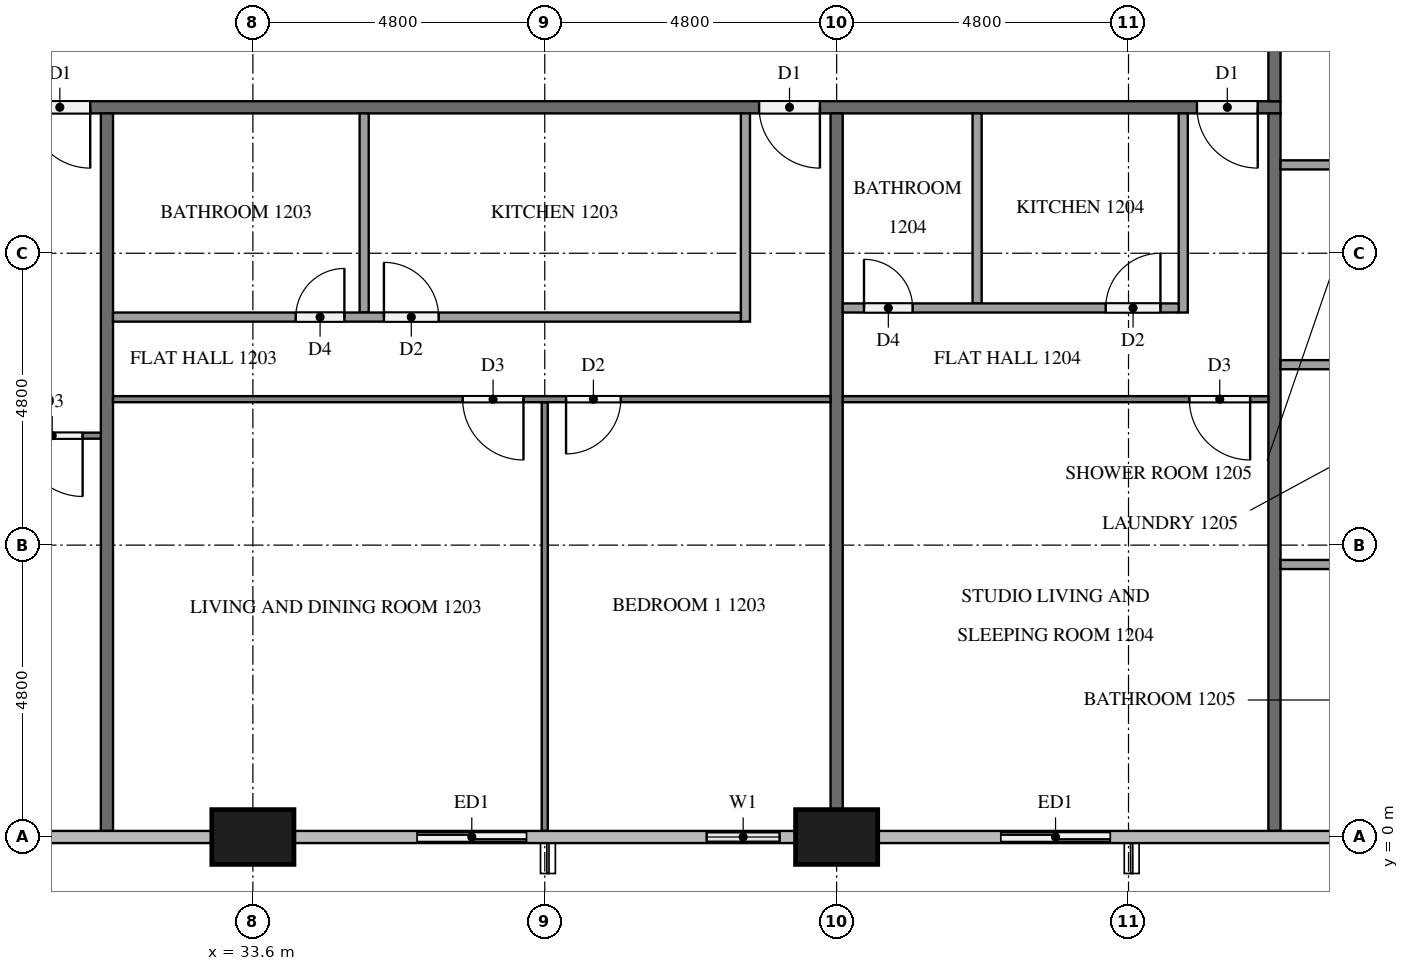
"""IFC4 building model, lengths in metres.
Left out: names, types, materials, properties, quantities, classifications, styles, units other than length and angle.
Written with IfcOpenShell. Run it as: python <this file> out.ifc"""

import sys

from ifc_helpers import new_model, si_unit, direction, frame, frame_2d, origin, origin_2d, place, context, subcontext, project, spatial, rectangle, extrude, element, fill, save


model = new_model("IFC4")
c1 = context("Model", 3, precision=1e-05, world=origin(), true_north=direction((0.0, 1.0)))
c2 = subcontext(c1, "Body", "Model", "MODEL_VIEW")
j1 = project(units=[si_unit("LENGTHUNIT", "METRE"), si_unit("PLANEANGLEUNIT", "RADIAN")], contexts=[c1])
p1 = place(None, origin())
s1 = spatial("IfcSite", under=j1, at=p1, CompositionType="ELEMENT")
p2 = place(p1, origin())
s2 = spatial("IfcBuilding", under=s1, at=p2, CompositionType="ELEMENT")
p3 = place(p2, frame((0.0, 0.0, 50.4)))
s3 = spatial("IfcBuildingStorey", under=s2, at=p3, CompositionType="ELEMENT", Elevation=50.4)
for number, where, z_axis, x_axis in (
    (1, (33.6, 0.0, 0.0), (0.0, 0.0, 1.0), (1.0, 0.0, 0.0)),
    (2, (43.2, 0.0, 0.0), (0.0, 0.0, 1.0), (1.0, 0.0, 0.0)),
):
    element("IfcColumn", number, at=place(p3, frame(where, z_axis=z_axis, x_axis=x_axis)), inside=s3, PredefinedType="COLUMN", context=c2, shape_type="SweptSolid", body=[
        extrude(rectangle(XDim=1.35, YDim=0.9, at=origin_2d()), origin(), (0.0, 0.0, 1.0), 3.1),
    ])
p4 = place(p3, frame((36.0, 0.0, 0.0), z_axis=(0.0, 0.0, 1.0), x_axis=(1.0, 0.0, 0.0)))
e3 = element("IfcWall", 3, at=p4, inside=s3, PredefinedType="SOLIDWALL", context=c2, shape_type="SweptSolid", body=[
    extrude(rectangle(XDim=2.4, YDim=0.15, at=frame_2d((1.2, 0.0))), origin(), (0.0, 0.0, 1.0), 3.1),
])
p5 = place(p4, frame((0.3, 0.0, 0.0)))
e4 = element("IfcOpeningElement", 4, at=p5, cuts=e3, PredefinedType="OPENING", context=c2, shape_type="SweptSolid", body=[
    extrude(rectangle(XDim=1.8, YDim=2.4, at=frame_2d((0.9, 1.2))), frame((0.0, 0.085, 0.0), z_axis=(0.0, -1.0, 0.0), x_axis=(1.0, 0.0, 0.0)), (0.0, 0.0, 1.0), 0.17),
])
p6 = place(p3, frame((40.8, 0.0, 0.0), z_axis=(0.0, 0.0, 1.0), x_axis=(1.0, 0.0, 0.0)))
e5 = element("IfcWall", 5, at=p6, inside=s3, PredefinedType="SOLIDWALL", context=c2, shape_type="SweptSolid", body=[
    extrude(rectangle(XDim=1.725, YDim=0.15, at=frame_2d((0.862, 0.0))), origin(), (0.0, 0.0, 1.0), 3.1),
])
p7 = place(p6, frame((0.262, 0.0, 0.9)))
e6 = element("IfcOpeningElement", 6, at=p7, cuts=e5, PredefinedType="OPENING", context=c2, shape_type="SweptSolid", body=[
    extrude(rectangle(XDim=1.2, YDim=1.4, at=frame_2d((0.6, 0.7))), frame((0.0, 0.085, 0.0), z_axis=(0.0, -1.0, 0.0), x_axis=(1.0, 0.0, 0.0)), (0.0, 0.0, 1.0), 0.17),
])
p8 = place(p3, frame((45.6, 0.0, 0.0), z_axis=(0.0, 0.0, 1.0), x_axis=(1.0, 0.0, 0.0)))
e7 = element("IfcWall", 7, at=p8, inside=s3, PredefinedType="SOLIDWALL", context=c2, shape_type="SweptSolid", body=[
    extrude(rectangle(XDim=2.4, YDim=0.15, at=frame_2d((1.2, 0.0))), origin(), (0.0, 0.0, 1.0), 3.1),
])
p9 = place(p8, frame((0.3, 0.0, 0.0)))
e8 = element("IfcOpeningElement", 8, at=p9, cuts=e7, PredefinedType="OPENING", context=c2, shape_type="SweptSolid", body=[
    extrude(rectangle(XDim=1.8, YDim=2.4, at=frame_2d((0.9, 1.2))), frame((0.0, 0.085, 0.0), z_axis=(0.0, -1.0, 0.0), x_axis=(1.0, 0.0, 0.0)), (0.0, 0.0, 1.0), 0.17),
])
p10 = place(p3, frame((50.5, 12.0, 0.0), z_axis=(0.0, 0.0, 1.0), x_axis=(-1.0, 0.0, 0.0)))
e9 = element("IfcWall", 9, at=p10, inside=s3, PredefinedType="PARTITIONING", context=c2, shape_type="SweptSolid", body=[
    extrude(rectangle(XDim=38.6, YDim=0.2, at=frame_2d((19.3, 0.0))), origin(), (0.0, 0.0, 1.0), 3.1),
])
p11 = place(p10, frame((36.375, 0.0, 0.0)))
e10 = element("IfcOpeningElement", 10, at=p11, cuts=e9, PredefinedType="OPENING", context=c2, shape_type="SweptSolid", body=[
    extrude(rectangle(XDim=1.0, YDim=2.1, at=frame_2d((0.5, 1.05))), frame((0.0, 0.11, 0.0), z_axis=(0.0, -1.0, 0.0), x_axis=(1.0, 0.0, 0.0)), (0.0, 0.0, 1.0), 0.22),
])
p12 = place(p10, frame((19.575, 0.0, 0.0)))
e11 = element("IfcOpeningElement", 11, at=p12, cuts=e9, PredefinedType="OPENING", context=c2, shape_type="SweptSolid", body=[
    extrude(rectangle(XDim=1.0, YDim=2.1, at=frame_2d((0.5, 1.05))), frame((0.0, 0.11, 0.0), z_axis=(0.0, -1.0, 0.0), x_axis=(1.0, 0.0, 0.0)), (0.0, 0.0, 1.0), 0.22),
])
p13 = place(p10, frame((7.575, 0.0, 0.0)))
e12 = element("IfcOpeningElement", 12, at=p13, cuts=e9, PredefinedType="OPENING", context=c2, shape_type="SweptSolid", body=[
    extrude(rectangle(XDim=1.0, YDim=2.1, at=frame_2d((0.5, 1.05))), frame((0.0, 0.11, 0.0), z_axis=(0.0, -1.0, 0.0), x_axis=(1.0, 0.0, 0.0)), (0.0, 0.0, 1.0), 0.22),
])
p14 = place(p10, frame((0.375, 0.0, 0.0)))
e13 = element("IfcOpeningElement", 13, at=p14, cuts=e9, PredefinedType="OPENING", context=c2, shape_type="SweptSolid", body=[
    extrude(rectangle(XDim=1.0, YDim=2.1, at=frame_2d((0.5, 1.05))), frame((0.0, 0.11, 0.0), z_axis=(0.0, -1.0, 0.0), x_axis=(1.0, 0.0, 0.0)), (0.0, 0.0, 1.0), 0.22),
])
p15 = place(p3, frame((50.4, 40.7, 0.0), z_axis=(0.0, 0.0, 1.0), x_axis=(0.0, -1.0, 0.0)))
e14 = element("IfcWall", 14, at=p15, inside=s3, PredefinedType="PARTITIONING", context=c2, shape_type="SweptSolid", body=[
    extrude(rectangle(XDim=28.6, YDim=0.2, at=frame_2d((14.3, 0.0))), origin(), (0.0, 0.0, 1.0), 3.1),
])
p16 = place(p15, frame((21.725, 0.0, 0.0)))
e15 = element("IfcOpeningElement", 15, at=p16, cuts=e14, PredefinedType="OPENING", context=c2, shape_type="SweptSolid", body=[
    extrude(rectangle(XDim=1.1, YDim=2.1, at=frame_2d((0.55, 1.05))), frame((0.0, 0.11, 0.0), z_axis=(0.0, -1.0, 0.0), x_axis=(1.0, 0.0, 0.0)), (0.0, 0.0, 1.0), 0.22),
])
p17 = place(p15, frame((12.175, 0.0, 0.0)))
e16 = element("IfcOpeningElement", 16, at=p17, cuts=e14, PredefinedType="OPENING", context=c2, shape_type="SweptSolid", body=[
    extrude(rectangle(XDim=1.0, YDim=2.1, at=frame_2d((0.5, 1.05))), frame((0.0, 0.11, 0.0), z_axis=(0.0, -1.0, 0.0), x_axis=(1.0, 0.0, 0.0)), (0.0, 0.0, 1.0), 0.22),
])
p18 = place(p15, frame((10.625, 0.0, 0.0)))
e17 = element("IfcOpeningElement", 17, at=p18, cuts=e14, PredefinedType="OPENING", context=c2, shape_type="SweptSolid", body=[
    extrude(rectangle(XDim=1.0, YDim=2.1, at=frame_2d((0.5, 1.05))), frame((0.0, 0.11, 0.0), z_axis=(0.0, -1.0, 0.0), x_axis=(1.0, 0.0, 0.0)), (0.0, 0.0, 1.0), 0.22),
])
p19 = place(p3, frame((31.2, 11.9, 0.0), z_axis=(0.0, 0.0, 1.0), x_axis=(0.0, -1.0, 0.0)))
e18 = element("IfcWall", 18, at=p19, inside=s3, PredefinedType="PARTITIONING", context=c2, shape_type="SweptSolid", body=[
    extrude(rectangle(XDim=11.8, YDim=0.2, at=frame_2d((5.9, 0.0))), origin(), (0.0, 0.0, 1.0), 3.1),
])
p20 = place(p3, frame((43.2, 11.9, 0.0), z_axis=(0.0, 0.0, 1.0), x_axis=(0.0, -1.0, 0.0)))
e19 = element("IfcWall", 19, at=p20, inside=s3, PredefinedType="PARTITIONING", context=c2, shape_type="SweptSolid", body=[
    extrude(rectangle(XDim=11.45, YDim=0.2, at=frame_2d((5.725, 0.0))), origin(), (0.0, 0.0, 1.0), 3.1),
])
p21 = place(p3, frame((50.4, 11.9, 0.0), z_axis=(0.0, 0.0, 1.0), x_axis=(0.0, -1.0, 0.0)))
e20 = element("IfcWall", 20, at=p21, inside=s3, PredefinedType="PARTITIONING", context=c2, shape_type="SweptSolid", body=[
    extrude(rectangle(XDim=11.8, YDim=0.2, at=frame_2d((5.9, 0.0))), origin(), (0.0, 0.0, 1.0), 3.1),
])
p22 = place(p3, frame((31.1, 6.6, 0.0), z_axis=(0.0, 0.0, 1.0), x_axis=(-1.0, 0.0, 0.0)))
e21 = element("IfcWall", 21, at=p22, inside=s3, PredefinedType="PARTITIONING", context=c2, shape_type="SweptSolid", body=[
    extrude(rectangle(XDim=16.6, YDim=0.1, at=frame_2d((8.3, 0.0))), origin(), (0.0, 0.0, 1.0), 3.1),
])
p23 = place(p22, frame((0.3, 0.0, 0.0)))
e22 = element("IfcOpeningElement", 22, at=p23, cuts=e21, PredefinedType="OPENING", context=c2, shape_type="SweptSolid", body=[
    extrude(rectangle(XDim=1.0, YDim=2.1, at=frame_2d((0.5, 1.05))), frame((0.0, 0.06, 0.0), z_axis=(0.0, -1.0, 0.0), x_axis=(1.0, 0.0, 0.0)), (0.0, 0.0, 1.0), 0.12),
])
p24 = place(p22, frame((10.65, 0.0, 0.0)))
e23 = element("IfcOpeningElement", 23, at=p24, cuts=e21, PredefinedType="OPENING", context=c2, shape_type="SweptSolid", body=[
    extrude(rectangle(XDim=0.9, YDim=2.1, at=frame_2d((0.45, 1.05))), frame((0.0, 0.06, 0.0), z_axis=(0.0, -1.0, 0.0), x_axis=(1.0, 0.0, 0.0)), (0.0, 0.0, 1.0), 0.12),
])
p25 = place(p22, frame((12.25, 0.0, 0.0)))
e24 = element("IfcOpeningElement", 24, at=p25, cuts=e21, PredefinedType="OPENING", context=c2, shape_type="SweptSolid", body=[
    extrude(rectangle(XDim=0.9, YDim=2.1, at=frame_2d((0.45, 1.05))), frame((0.0, 0.06, 0.0), z_axis=(0.0, -1.0, 0.0), x_axis=(1.0, 0.0, 0.0)), (0.0, 0.0, 1.0), 0.12),
])
p26 = place(p3, frame((38.4, 7.15, 0.0), z_axis=(0.0, 0.0, 1.0), x_axis=(0.0, -1.0, 0.0)))
e25 = element("IfcWall", 25, at=p26, inside=s3, PredefinedType="PARTITIONING", context=c2, shape_type="SweptSolid", body=[
    extrude(rectangle(XDim=7.05, YDim=0.1, at=frame_2d((3.525, 0.0))), origin(), (0.0, 0.0, 1.0), 3.1),
])
p27 = place(p3, frame((43.1, 7.2, 0.0), z_axis=(0.0, 0.0, 1.0), x_axis=(-1.0, 0.0, 0.0)))
e26 = element("IfcWall", 26, at=p27, inside=s3, PredefinedType="PARTITIONING", context=c2, shape_type="SweptSolid", body=[
    extrude(rectangle(XDim=11.8, YDim=0.1, at=frame_2d((5.9, 0.0))), origin(), (0.0, 0.0, 1.0), 3.1),
])
p28 = place(p27, frame((3.45, 0.0, 0.0)))
e27 = element("IfcOpeningElement", 27, at=p28, cuts=e26, PredefinedType="OPENING", context=c2, shape_type="SweptSolid", body=[
    extrude(rectangle(XDim=0.9, YDim=2.1, at=frame_2d((0.45, 1.05))), frame((0.0, 0.06, 0.0), z_axis=(0.0, -1.0, 0.0), x_axis=(1.0, 0.0, 0.0)), (0.0, 0.0, 1.0), 0.12),
])
p29 = place(p27, frame((5.05, 0.0, 0.0)))
e28 = element("IfcOpeningElement", 28, at=p29, cuts=e26, PredefinedType="OPENING", context=c2, shape_type="SweptSolid", body=[
    extrude(rectangle(XDim=1.0, YDim=2.1, at=frame_2d((0.5, 1.05))), frame((0.0, 0.06, 0.0), z_axis=(0.0, -1.0, 0.0), x_axis=(1.0, 0.0, 0.0)), (0.0, 0.0, 1.0), 0.12),
])
p30 = place(p3, frame((35.43, 11.9, 0.0), z_axis=(0.0, 0.0, 1.0), x_axis=(0.0, -1.0, 0.0)))
e29 = element("IfcWall", 29, at=p30, inside=s3, PredefinedType="PARTITIONING", context=c2, shape_type="SweptSolid", body=[
    extrude(rectangle(XDim=3.275, YDim=0.15, at=frame_2d((1.637, 0.0))), origin(), (0.0, 0.0, 1.0), 3.1),
])
p31 = place(p3, frame((41.7, 11.9, 0.0), z_axis=(0.0, 0.0, 1.0), x_axis=(0.0, -1.0, 0.0)))
e30 = element("IfcWall", 30, at=p31, inside=s3, PredefinedType="PARTITIONING", context=c2, shape_type="SweptSolid", body=[
    extrude(rectangle(XDim=3.425, YDim=0.15, at=frame_2d((1.712, 0.0))), origin(), (0.0, 0.0, 1.0), 3.1),
])
p32 = place(p3, frame((31.3, 8.55, 0.0), z_axis=(0.0, 0.0, 1.0), x_axis=(1.0, 0.0, 0.0)))
e31 = element("IfcWall", 31, at=p32, inside=s3, PredefinedType="PARTITIONING", context=c2, shape_type="SweptSolid", body=[
    extrude(rectangle(XDim=10.325, YDim=0.15, at=frame_2d((5.163, 0.0))), origin(), (0.0, 0.0, 1.0), 3.1),
])
p33 = place(p32, frame((4.455, 0.0, 0.0)))
e32 = element("IfcOpeningElement", 32, at=p33, cuts=e31, PredefinedType="OPENING", context=c2, shape_type="SweptSolid", body=[
    extrude(rectangle(XDim=0.9, YDim=2.1, at=frame_2d((0.45, 1.05))), frame((0.0, 0.085, 0.0), z_axis=(0.0, -1.0, 0.0), x_axis=(1.0, 0.0, 0.0)), (0.0, 0.0, 1.0), 0.17),
])
p34 = place(p32, frame((3.005, 0.0, 0.0)))
e33 = element("IfcOpeningElement", 33, at=p34, cuts=e31, PredefinedType="OPENING", context=c2, shape_type="SweptSolid", body=[
    extrude(rectangle(XDim=0.8, YDim=2.1, at=frame_2d((0.4, 1.05))), frame((0.0, 0.085, 0.0), z_axis=(0.0, -1.0, 0.0), x_axis=(1.0, 0.0, 0.0)), (0.0, 0.0, 1.0), 0.17),
])
p35 = place(p3, frame((50.3, 7.2, 0.0), z_axis=(0.0, 0.0, 1.0), x_axis=(-1.0, 0.0, 0.0)))
e34 = element("IfcWall", 34, at=p35, inside=s3, PredefinedType="PARTITIONING", context=c2, shape_type="SweptSolid", body=[
    extrude(rectangle(XDim=7.0, YDim=0.1, at=frame_2d((3.5, 0.0))), origin(), (0.0, 0.0, 1.0), 3.1),
])
p36 = place(p35, frame((0.3, 0.0, 0.0)))
e35 = element("IfcOpeningElement", 35, at=p36, cuts=e34, PredefinedType="OPENING", context=c2, shape_type="SweptSolid", body=[
    extrude(rectangle(XDim=1.0, YDim=2.1, at=frame_2d((0.5, 1.05))), frame((0.0, 0.06, 0.0), z_axis=(0.0, -1.0, 0.0), x_axis=(1.0, 0.0, 0.0)), (0.0, 0.0, 1.0), 0.12),
])
p37 = place(p3, frame((45.51, 11.9, 0.0), z_axis=(0.0, 0.0, 1.0), x_axis=(0.0, -1.0, 0.0)))
e36 = element("IfcWall", 36, at=p37, inside=s3, PredefinedType="PARTITIONING", context=c2, shape_type="SweptSolid", body=[
    extrude(rectangle(XDim=3.125, YDim=0.15, at=frame_2d((1.562, 0.0))), origin(), (0.0, 0.0, 1.0), 3.1),
])
p38 = place(p3, frame((48.9, 11.9, 0.0), z_axis=(0.0, 0.0, 1.0), x_axis=(0.0, -1.0, 0.0)))
e37 = element("IfcWall", 37, at=p38, inside=s3, PredefinedType="PARTITIONING", context=c2, shape_type="SweptSolid", body=[
    extrude(rectangle(XDim=3.275, YDim=0.15, at=frame_2d((1.637, 0.0))), origin(), (0.0, 0.0, 1.0), 3.1),
])
p39 = place(p3, frame((43.3, 8.7, 0.0), z_axis=(0.0, 0.0, 1.0), x_axis=(1.0, 0.0, 0.0)))
e38 = element("IfcWall", 38, at=p39, inside=s3, PredefinedType="PARTITIONING", context=c2, shape_type="SweptSolid", body=[
    extrude(rectangle(XDim=5.525, YDim=0.15, at=frame_2d((2.762, 0.0))), origin(), (0.0, 0.0, 1.0), 3.1),
])
p40 = place(p39, frame((4.325, 0.0, 0.0)))
e39 = element("IfcOpeningElement", 39, at=p40, cuts=e38, PredefinedType="OPENING", context=c2, shape_type="SweptSolid", body=[
    extrude(rectangle(XDim=0.9, YDim=2.1, at=frame_2d((0.45, 1.05))), frame((0.0, 0.085, 0.0), z_axis=(0.0, -1.0, 0.0), x_axis=(1.0, 0.0, 0.0)), (0.0, 0.0, 1.0), 0.17),
])
p41 = place(p39, frame((0.35, 0.0, 0.0)))
e40 = element("IfcOpeningElement", 40, at=p41, cuts=e38, PredefinedType="OPENING", context=c2, shape_type="SweptSolid", body=[
    extrude(rectangle(XDim=0.8, YDim=2.1, at=frame_2d((0.4, 1.05))), frame((0.0, 0.085, 0.0), z_axis=(0.0, -1.0, 0.0), x_axis=(1.0, 0.0, 0.0)), (0.0, 0.0, 1.0), 0.17),
])
for number, where, z_axis, x_axis in (
    (41, (50.5, 11.053, 0.0), (0.0, 0.0, 1.0), (1.0, 0.0, 0.0)),
    (42, (50.5, 7.767, 0.0), (0.0, 0.0, 1.0), (1.0, 0.0, 0.0)),
    (43, (50.5, 4.481, 0.0), (0.0, 0.0, 1.0), (1.0, 0.0, 0.0)),
):
    element("IfcWall", number, at=place(p3, frame(where, z_axis=z_axis, x_axis=x_axis)), inside=s3, PredefinedType="PARTITIONING", context=c2, shape_type="SweptSolid", body=[
        extrude(rectangle(XDim=1.775, YDim=0.15, at=frame_2d((0.887, 0.0))), origin(), (0.0, 0.0, 1.0), 3.1),
    ])
p42 = place(p5, origin())
e44 = element("IfcDoor", 44, at=p42, inside=s3, OperationType="SLIDING_TO_RIGHT", PredefinedType="DOOR", context=c2, shape_type="SweptSolid", body=[
    extrude(rectangle(XDim=1.8, YDim=2.4, at=frame_2d((0.9, 1.2))), frame((0.0, 0.025, 0.0), z_axis=(0.0, -1.0, 0.0), x_axis=(1.0, 0.0, 0.0)), (0.0, 0.0, 1.0), 0.05),
])
fill(e4, e44)
p43 = place(p7, origin())
e45 = element("IfcWindow", 45, at=p43, inside=s3, PartitioningType="SINGLE_PANEL", PredefinedType="WINDOW", context=c2, shape_type="SweptSolid", body=[
    extrude(rectangle(XDim=1.2, YDim=1.4, at=frame_2d((0.6, 0.7))), frame((0.0, 0.03, 0.0), z_axis=(0.0, -1.0, 0.0), x_axis=(1.0, 0.0, 0.0)), (0.0, 0.0, 1.0), 0.06),
])
fill(e6, e45)
p44 = place(p9, origin())
e46 = element("IfcDoor", 46, at=p44, inside=s3, OperationType="SLIDING_TO_LEFT", PredefinedType="DOOR", context=c2, shape_type="SweptSolid", body=[
    extrude(rectangle(XDim=1.8, YDim=2.4, at=frame_2d((0.9, 1.2))), frame((0.0, 0.025, 0.0), z_axis=(0.0, -1.0, 0.0), x_axis=(1.0, 0.0, 0.0)), (0.0, 0.0, 1.0), 0.05),
])
fill(e8, e46)
p45 = place(p12, origin())
e47 = element("IfcDoor", 47, at=p45, inside=s3, OperationType="SINGLE_SWING_LEFT", PredefinedType="DOOR", context=c2, shape_type="SweptSolid", body=[
    extrude(rectangle(XDim=1.0, YDim=2.1, at=frame_2d((0.5, 1.05))), frame((0.0, 0.025, 0.0), z_axis=(0.0, -1.0, 0.0), x_axis=(1.0, 0.0, 0.0)), (0.0, 0.0, 1.0), 0.05),
])
fill(e11, e47)
p46 = place(p13, origin())
e48 = element("IfcDoor", 48, at=p46, inside=s3, OperationType="SINGLE_SWING_LEFT", PredefinedType="DOOR", context=c2, shape_type="SweptSolid", body=[
    extrude(rectangle(XDim=1.0, YDim=2.1, at=frame_2d((0.5, 1.05))), frame((0.0, 0.025, 0.0), z_axis=(0.0, -1.0, 0.0), x_axis=(1.0, 0.0, 0.0)), (0.0, 0.0, 1.0), 0.05),
])
fill(e12, e48)
p47 = place(p14, origin())
e49 = element("IfcDoor", 49, at=p47, inside=s3, OperationType="SINGLE_SWING_LEFT", PredefinedType="DOOR", context=c2, shape_type="SweptSolid", body=[
    extrude(rectangle(XDim=1.0, YDim=2.1, at=frame_2d((0.5, 1.05))), frame((0.0, 0.025, 0.0), z_axis=(0.0, -1.0, 0.0), x_axis=(1.0, 0.0, 0.0)), (0.0, 0.0, 1.0), 0.05),
])
fill(e13, e49)
p48 = place(p23, origin())
e50 = element("IfcDoor", 50, at=p48, inside=s3, OperationType="SINGLE_SWING_LEFT", PredefinedType="DOOR", context=c2, shape_type="SweptSolid", body=[
    extrude(rectangle(XDim=1.0, YDim=2.1, at=frame_2d((0.5, 1.05))), frame((0.0, 0.025, 0.0), z_axis=(0.0, -1.0, 0.0), x_axis=(1.0, 0.0, 0.0)), (0.0, 0.0, 1.0), 0.05),
])
fill(e22, e50)
p49 = place(p28, origin())
e51 = element("IfcDoor", 51, at=p49, inside=s3, OperationType="SINGLE_SWING_RIGHT", PredefinedType="DOOR", context=c2, shape_type="SweptSolid", body=[
    extrude(rectangle(XDim=0.9, YDim=2.1, at=frame_2d((0.45, 1.05))), frame((0.0, 0.025, 0.0), z_axis=(0.0, -1.0, 0.0), x_axis=(1.0, 0.0, 0.0)), (0.0, 0.0, 1.0), 0.05),
])
fill(e27, e51)
p50 = place(p29, origin())
e52 = element("IfcDoor", 52, at=p50, inside=s3, OperationType="SINGLE_SWING_LEFT", PredefinedType="DOOR", context=c2, shape_type="SweptSolid", body=[
    extrude(rectangle(XDim=1.0, YDim=2.1, at=frame_2d((0.5, 1.05))), frame((0.0, 0.025, 0.0), z_axis=(0.0, -1.0, 0.0), x_axis=(1.0, 0.0, 0.0)), (0.0, 0.0, 1.0), 0.05),
])
fill(e28, e52)
p51 = place(p33, origin())
e53 = element("IfcDoor", 53, at=p51, inside=s3, OperationType="SINGLE_SWING_LEFT", PredefinedType="DOOR", context=c2, shape_type="SweptSolid", body=[
    extrude(rectangle(XDim=0.9, YDim=2.1, at=frame_2d((0.45, 1.05))), frame((0.0, 0.025, 0.0), z_axis=(0.0, -1.0, 0.0), x_axis=(1.0, 0.0, 0.0)), (0.0, 0.0, 1.0), 0.05),
])
fill(e32, e53)
p52 = place(p34, origin())
e54 = element("IfcDoor", 54, at=p52, inside=s3, OperationType="SINGLE_SWING_RIGHT", PredefinedType="DOOR", context=c2, shape_type="SweptSolid", body=[
    extrude(rectangle(XDim=0.8, YDim=2.1, at=frame_2d((0.4, 1.05))), frame((0.0, 0.025, 0.0), z_axis=(0.0, -1.0, 0.0), x_axis=(1.0, 0.0, 0.0)), (0.0, 0.0, 1.0), 0.05),
])
fill(e33, e54)
p53 = place(p36, origin())
e55 = element("IfcDoor", 55, at=p53, inside=s3, OperationType="SINGLE_SWING_LEFT", PredefinedType="DOOR", context=c2, shape_type="SweptSolid", body=[
    extrude(rectangle(XDim=1.0, YDim=2.1, at=frame_2d((0.5, 1.05))), frame((0.0, 0.025, 0.0), z_axis=(0.0, -1.0, 0.0), x_axis=(1.0, 0.0, 0.0)), (0.0, 0.0, 1.0), 0.05),
])
fill(e35, e55)
p54 = place(p40, origin())
e56 = element("IfcDoor", 56, at=p54, inside=s3, OperationType="SINGLE_SWING_RIGHT", PredefinedType="DOOR", context=c2, shape_type="SweptSolid", body=[
    extrude(rectangle(XDim=0.9, YDim=2.1, at=frame_2d((0.45, 1.05))), frame((0.0, 0.025, 0.0), z_axis=(0.0, -1.0, 0.0), x_axis=(1.0, 0.0, 0.0)), (0.0, 0.0, 1.0), 0.05),
])
fill(e39, e56)
p55 = place(p41, origin())
e57 = element("IfcDoor", 57, at=p55, inside=s3, OperationType="SINGLE_SWING_LEFT", PredefinedType="DOOR", context=c2, shape_type="SweptSolid", body=[
    extrude(rectangle(XDim=0.8, YDim=2.1, at=frame_2d((0.4, 1.05))), frame((0.0, 0.025, 0.0), z_axis=(0.0, -1.0, 0.0), x_axis=(1.0, 0.0, 0.0)), (0.0, 0.0, 1.0), 0.05),
])
fill(e40, e57)
save(model, sys.argv[1])
